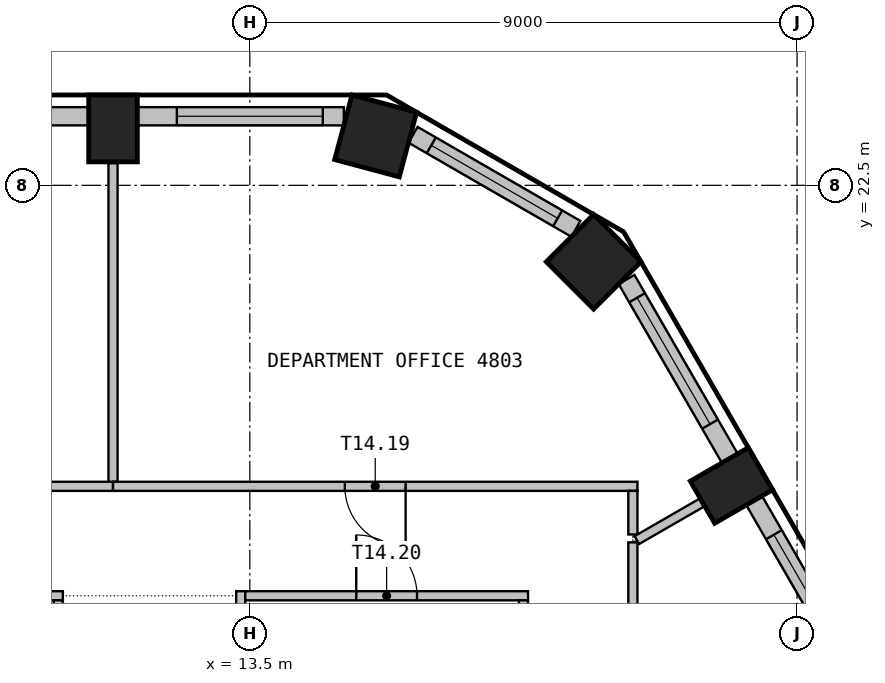
"""IFC4 building model, lengths in metres.
Left out: names, types, materials, properties, quantities, classifications, styles, units other than length and angle.
Written with IfcOpenShell. Run it as: python <this file> out.ifc"""

import sys

from ifc_helpers import new_model, si_unit, direction, frame, frame_2d, origin, origin_2d, place, context, subcontext, project, spatial, rectangle, extrude, element, fill, save


model = new_model("IFC4")
c1 = context("Model", 3, precision=1e-05, world=origin(), true_north=direction((0.0, 1.0)))
c2 = subcontext(c1, "Body", "Model", "MODEL_VIEW")
j1 = project(units=[si_unit("LENGTHUNIT", "METRE"), si_unit("PLANEANGLEUNIT", "RADIAN")], contexts=[c1])
p1 = place(None, origin())
s1 = spatial("IfcSite", under=j1, at=p1, CompositionType="ELEMENT")
p2 = place(p1, origin())
s2 = spatial("IfcBuilding", under=s1, at=p2, CompositionType="ELEMENT")
p3 = place(p2, frame((0.0, 0.0, 195.6)))
s3 = spatial("IfcBuildingStorey", under=s2, at=p3, CompositionType="ELEMENT", Elevation=195.6)
p4 = place(p3, frame((21.421, 17.563, 0.0), z_axis=(0.0, 0.0, 1.0), x_axis=(-0.5, 0.866025403784, 0.0)))
e1 = element("IfcColumn", 1, at=p4, inside=s3, PredefinedType="COLUMN", context=c2, shape_type="SweptSolid", body=[
    extrude(rectangle(XDim=0.8, YDim=1.1, at=origin_2d()), origin(), (0.0, 0.0, 1.0), 3.55),
])
for number, where, z_axis, x_axis in (
    (2, (19.154, 21.242, 0.0), (0.0, 0.0, 1.0), (-0.707, 0.707, 0.0)),
    (3, (15.57, 23.312, 0.0), (0.0, 0.0, 1.0), (-0.966, 0.259, 0.0)),
):
    element("IfcColumn", number, at=place(p3, frame(where, z_axis=z_axis, x_axis=x_axis)), inside=s3, PredefinedType="COLUMN", context=c2, shape_type="SweptSolid", body=[
        extrude(rectangle(XDim=1.1, YDim=1.1, at=origin_2d()), origin(), (0.0, 0.0, 1.0), 3.55),
    ])
p5 = place(p3, frame((11.25, 23.436, 0.0), z_axis=(0.0, 0.0, 1.0), x_axis=(-1.0, 0.0, 0.0)))
e4 = element("IfcColumn", 4, at=p5, inside=s3, PredefinedType="COLUMN", context=c2, shape_type="SweptSolid", body=[
    extrude(rectangle(XDim=0.8, YDim=1.1, at=origin_2d()), origin(), (0.0, 0.0, 1.0), 3.55),
])
p6 = place(p3, frame((23.644, 14.113, 0.0), z_axis=(0.0, 0.0, 1.0), x_axis=(-0.500029062817, 0.866008623709, 0.0)))
e5 = element("IfcWall", 5, at=p6, inside=s3, PredefinedType="SOLIDWALL", context=c2, shape_type="SweptSolid", body=[
    extrude(rectangle(XDim=3.699, YDim=0.3, at=frame_2d((1.85, 0.0))), origin(), (0.0, 0.0, 1.0), 3.55),
])
p7 = place(p6, frame((0.649, 0.0, 0.9)))
e6 = element("IfcOpeningElement", 6, at=p7, cuts=e5, PredefinedType="OPENING", context=c2, shape_type="SweptSolid", body=[
    extrude(rectangle(XDim=2.4, YDim=2.1, at=frame_2d((1.2, 1.05))), frame((0.0, 0.16, 0.0), z_axis=(0.0, -1.0, 0.0), x_axis=(1.0, 0.0, 0.0)), (0.0, 0.0, 1.0), 0.32),
])
p8 = place(p3, frame((21.394, 18.01, 0.0), z_axis=(0.0, 0.0, 1.0), x_axis=(-0.500012868213, 0.866017974191, 0.0)))
e7 = element("IfcWall", 7, at=p8, inside=s3, PredefinedType="SOLIDWALL", context=c2, shape_type="SweptSolid", body=[
    extrude(rectangle(XDim=3.396, YDim=0.3, at=frame_2d((1.698, 0.0))), origin(), (0.0, 0.0, 1.0), 3.55),
])
p9 = place(p8, frame((0.649, 0.0, 0.9)))
e8 = element("IfcOpeningElement", 8, at=p9, cuts=e7, PredefinedType="OPENING", context=c2, shape_type="SweptSolid", body=[
    extrude(rectangle(XDim=2.4, YDim=2.1, at=frame_2d((1.2, 1.05))), frame((0.0, 0.16, 0.0), z_axis=(0.0, -1.0, 0.0), x_axis=(1.0, 0.0, 0.0)), (0.0, 0.0, 1.0), 0.32),
])
p10 = place(p3, frame((18.863, 21.784, 0.0), z_axis=(0.0, 0.0, 1.0), x_axis=(-0.865994975416, 0.500052699777, 0.0)))
e9 = element("IfcWall", 9, at=p10, inside=s3, PredefinedType="SOLIDWALL", context=c2, shape_type="SweptSolid", body=[
    extrude(rectangle(XDim=3.093, YDim=0.3, at=frame_2d((1.546, 0.0))), origin(), (0.0, 0.0, 1.0), 3.55),
])
p11 = place(p10, frame((0.346, 0.0, 0.9)))
e10 = element("IfcOpeningElement", 10, at=p11, cuts=e9, PredefinedType="OPENING", context=c2, shape_type="SweptSolid", body=[
    extrude(rectangle(XDim=2.4, YDim=2.1, at=frame_2d((1.2, 1.05))), frame((0.0, 0.16, 0.0), z_axis=(0.0, -1.0, 0.0), x_axis=(1.0, 0.0, 0.0)), (0.0, 0.0, 1.0), 0.32),
])
p12 = place(p3, frame((15.046, 23.635, 0.0), z_axis=(0.0, 0.0, 1.0), x_axis=(-1.0, 0.0, 0.0)))
e11 = element("IfcWall", 11, at=p12, inside=s3, PredefinedType="SOLIDWALL", context=c2, shape_type="SweptSolid", body=[
    extrude(rectangle(XDim=3.396, YDim=0.3, at=frame_2d((1.698, 0.0))), origin(), (0.0, 0.0, 1.0), 3.55),
])
p13 = place(p12, frame((0.346, 0.0, 0.9)))
e12 = element("IfcOpeningElement", 12, at=p13, cuts=e11, PredefinedType="OPENING", context=c2, shape_type="SweptSolid", body=[
    extrude(rectangle(XDim=2.4, YDim=2.1, at=frame_2d((1.2, 1.05))), frame((0.0, 0.16, 0.0), z_axis=(0.0, -1.0, 0.0), x_axis=(1.0, 0.0, 0.0)), (0.0, 0.0, 1.0), 0.32),
])
p14 = place(p3, frame((10.85, 23.635, 0.0), z_axis=(0.0, 0.0, 1.0), x_axis=(-1.0, 0.0, 0.0)))
e13 = element("IfcWall", 13, at=p14, inside=s3, PredefinedType="SOLIDWALL", context=c2, shape_type="SweptSolid", body=[
    extrude(rectangle(XDim=3.699, YDim=0.3, at=frame_2d((1.85, 0.0))), origin(), (0.0, 0.0, 1.0), 3.55),
])
p15 = place(p14, frame((0.649, 0.0, 0.9)))
e14 = element("IfcOpeningElement", 14, at=p15, cuts=e13, PredefinedType="OPENING", context=c2, shape_type="SweptSolid", body=[
    extrude(rectangle(XDim=2.4, YDim=2.1, at=frame_2d((1.2, 1.05))), frame((0.0, 0.16, 0.0), z_axis=(0.0, -1.0, 0.0), x_axis=(1.0, 0.0, 0.0)), (0.0, 0.0, 1.0), 0.32),
])
p16 = place(p3, frame((11.25, 17.55, 0.0), z_axis=(0.0, 0.0, 1.0), x_axis=(-1.0, 0.0, 0.0)))
e15 = element("IfcWall", 15, at=p16, inside=s3, PredefinedType="PARTITIONING", context=c2, shape_type="SweptSolid", body=[
    extrude(rectangle(XDim=18.0, YDim=0.15, at=frame_2d((9.0, 0.0))), origin(), (0.0, 0.0, 1.0), 3.55),
])
p17 = place(p16, frame((8.5, 0.0, 0.0)))
e16 = element("IfcOpeningElement", 16, at=p17, cuts=e15, PredefinedType="OPENING", context=c2, shape_type="SweptSolid", body=[
    extrude(rectangle(XDim=1.0, YDim=2.1, at=frame_2d((0.5, 1.05))), frame((0.0, 0.085, 0.0), z_axis=(0.0, -1.0, 0.0), x_axis=(1.0, 0.0, 0.0)), (0.0, 0.0, 1.0), 0.17),
])
p18 = place(p3, frame((6.0, 15.75, 0.0), z_axis=(0.0, 0.0, 1.0), x_axis=(1.0, 0.0, 0.0)))
e17 = element("IfcWall", 17, at=p18, inside=s3, PredefinedType="PARTITIONING", context=c2, shape_type="SweptSolid", body=[
    extrude(rectangle(XDim=4.425, YDim=0.15, at=frame_2d((2.212, 0.0))), origin(), (0.0, 0.0, 1.0), 3.55),
])
p19 = place(p18, frame((1.712, 0.0, 0.0)))
e18 = element("IfcOpeningElement", 18, at=p19, cuts=e17, PredefinedType="OPENING", context=c2, shape_type="SweptSolid", body=[
    extrude(rectangle(XDim=1.0, YDim=2.1, at=frame_2d((0.5, 1.05))), frame((0.0, 0.085, 0.0), z_axis=(0.0, -1.0, 0.0), x_axis=(1.0, 0.0, 0.0)), (0.0, 0.0, 1.0), 0.17),
])
p20 = place(p3, frame((10.35, 15.675, 0.0), z_axis=(0.0, 0.0, 1.0), x_axis=(0.0, -1.0, 0.0)))
e19 = element("IfcWall", 19, at=p20, inside=s3, PredefinedType="PARTITIONING", context=c2, shape_type="SweptSolid", body=[
    extrude(rectangle(XDim=4.425, YDim=0.15, at=frame_2d((2.212, 0.0))), origin(), (0.0, 0.0, 1.0), 3.55),
])
p21 = place(p3, frame((11.25, 22.865, 0.0), z_axis=(0.0, 0.0, 1.0), x_axis=(0.0, -1.0, 0.0)))
e20 = element("IfcWall", 20, at=p21, inside=s3, PredefinedType="PARTITIONING", context=c2, shape_type="SweptSolid", body=[
    extrude(rectangle(XDim=5.24, YDim=0.15, at=frame_2d((2.62, 0.0))), origin(), (0.0, 0.0, 1.0), 3.55),
])
p22 = place(p3, frame((19.875, 17.55, 0.0), z_axis=(0.0, 0.0, 1.0), x_axis=(-1.0, 0.0, 0.0)))
e21 = element("IfcWall", 21, at=p22, inside=s3, PredefinedType="PARTITIONING", context=c2, shape_type="SweptSolid", body=[
    extrude(rectangle(XDim=8.625, YDim=0.15, at=frame_2d((4.312, 0.0))), origin(), (0.0, 0.0, 1.0), 3.55),
])
p23 = place(p22, frame((3.812, 0.0, 0.0)))
e22 = element("IfcOpeningElement", 22, at=p23, cuts=e21, PredefinedType="OPENING", context=c2, shape_type="SweptSolid", body=[
    extrude(rectangle(XDim=1.0, YDim=2.1, at=frame_2d((0.5, 1.05))), frame((0.0, 0.085, 0.0), z_axis=(0.0, -1.0, 0.0), x_axis=(1.0, 0.0, 0.0)), (0.0, 0.0, 1.0), 0.17),
])
p24 = place(p3, frame((13.35, 11.25, 0.0), z_axis=(0.0, 0.0, 1.0), x_axis=(0.0, 1.0, 0.0)))
e23 = element("IfcWall", 23, at=p24, inside=s3, PredefinedType="PARTITIONING", context=c2, shape_type="SweptSolid", body=[
    extrude(rectangle(XDim=4.575, YDim=0.15, at=frame_2d((2.288, 0.0))), origin(), (0.0, 0.0, 1.0), 3.55),
])
p25 = place(p3, frame((13.425, 15.75, 0.0), z_axis=(0.0, 0.0, 1.0), x_axis=(1.0, 0.0, 0.0)))
e24 = element("IfcWall", 24, at=p25, inside=s3, PredefinedType="PARTITIONING", context=c2, shape_type="SweptSolid", body=[
    extrude(rectangle(XDim=4.65, YDim=0.15, at=frame_2d((2.325, 0.0))), origin(), (0.0, 0.0, 1.0), 3.55),
])
p26 = place(p25, frame((1.825, 0.0, 0.0)))
e25 = element("IfcOpeningElement", 25, at=p26, cuts=e24, PredefinedType="OPENING", context=c2, shape_type="SweptSolid", body=[
    extrude(rectangle(XDim=1.0, YDim=2.1, at=frame_2d((0.5, 1.05))), frame((0.0, 0.085, 0.0), z_axis=(0.0, -1.0, 0.0), x_axis=(1.0, 0.0, 0.0)), (0.0, 0.0, 1.0), 0.17),
])
p27 = place(p3, frame((18.0, 15.675, 0.0), z_axis=(0.0, 0.0, 1.0), x_axis=(0.0, -1.0, 0.0)))
e26 = element("IfcWall", 26, at=p27, inside=s3, PredefinedType="PARTITIONING", context=c2, shape_type="SweptSolid", body=[
    extrude(rectangle(XDim=4.425, YDim=0.15, at=frame_2d((2.212, 0.0))), origin(), (0.0, 0.0, 1.0), 3.55),
])
p28 = place(p3, frame((19.8, 6.235, 0.0), z_axis=(0.0, 0.0, 1.0), x_axis=(0.0, 1.0, 0.0)))
e27 = element("IfcWall", 27, at=p28, inside=s3, PredefinedType="PARTITIONING", context=c2, shape_type="SweptSolid", body=[
    extrude(rectangle(XDim=10.393, YDim=0.15, at=frame_2d((5.196, 0.0))), origin(), (0.0, 0.0, 1.0), 3.55),
])
p29 = place(p28, frame((4.697, 0.0, 0.0)))
e28 = element("IfcOpeningElement", 28, at=p29, cuts=e27, PredefinedType="OPENING", context=c2, shape_type="SweptSolid", body=[
    extrude(rectangle(XDim=1.0, YDim=2.1, at=frame_2d((0.5, 1.05))), frame((0.0, 0.085, 0.0), z_axis=(0.0, -1.0, 0.0), x_axis=(1.0, 0.0, 0.0)), (0.0, 0.0, 1.0), 0.17),
])
p30 = place(p3, frame((19.8, 16.758, 0.0), z_axis=(0.0, 0.0, 1.0), x_axis=(0.0, 1.0, 0.0)))
e29 = element("IfcWall", 29, at=p30, inside=s3, PredefinedType="PARTITIONING", context=c2, shape_type="SweptSolid", body=[
    extrude(rectangle(XDim=0.717, YDim=0.15, at=frame_2d((0.358, 0.0))), origin(), (0.0, 0.0, 1.0), 3.55),
])
p31 = place(p3, frame((20.927, 17.278, 0.0), z_axis=(0.0, 0.0, 1.0), x_axis=(-0.866202157257, -0.499693728962, 0.0)))
e30 = element("IfcWall", 30, at=p31, inside=s3, PredefinedType="PARTITIONING", context=c2, shape_type="SweptSolid", body=[
    extrude(rectangle(XDim=1.226, YDim=0.15, at=frame_2d((0.613, 0.0))), origin(), (0.0, 0.0, 1.0), 3.55),
])
p32 = place(p7, origin())
e31 = element("IfcWindow", 31, at=p32, inside=s3, PartitioningType="SINGLE_PANEL", PredefinedType="WINDOW", context=c2, shape_type="SweptSolid", body=[
    extrude(rectangle(XDim=2.4, YDim=2.1, at=frame_2d((1.2, 1.05))), frame((0.0, 0.03, 0.0), z_axis=(0.0, -1.0, 0.0), x_axis=(1.0, 0.0, 0.0)), (0.0, 0.0, 1.0), 0.06),
])
fill(e6, e31)
p33 = place(p9, origin())
e32 = element("IfcWindow", 32, at=p33, inside=s3, PartitioningType="SINGLE_PANEL", PredefinedType="WINDOW", context=c2, shape_type="SweptSolid", body=[
    extrude(rectangle(XDim=2.4, YDim=2.1, at=frame_2d((1.2, 1.05))), frame((0.0, 0.03, 0.0), z_axis=(0.0, -1.0, 0.0), x_axis=(1.0, 0.0, 0.0)), (0.0, 0.0, 1.0), 0.06),
])
fill(e8, e32)
p34 = place(p11, origin())
e33 = element("IfcWindow", 33, at=p34, inside=s3, PartitioningType="SINGLE_PANEL", PredefinedType="WINDOW", context=c2, shape_type="SweptSolid", body=[
    extrude(rectangle(XDim=2.4, YDim=2.1, at=frame_2d((1.2, 1.05))), frame((0.0, 0.03, 0.0), z_axis=(0.0, -1.0, 0.0), x_axis=(1.0, 0.0, 0.0)), (0.0, 0.0, 1.0), 0.06),
])
fill(e10, e33)
p35 = place(p13, origin())
e34 = element("IfcWindow", 34, at=p35, inside=s3, PartitioningType="SINGLE_PANEL", PredefinedType="WINDOW", context=c2, shape_type="SweptSolid", body=[
    extrude(rectangle(XDim=2.4, YDim=2.1, at=frame_2d((1.2, 1.05))), frame((0.0, 0.03, 0.0), z_axis=(0.0, -1.0, 0.0), x_axis=(1.0, 0.0, 0.0)), (0.0, 0.0, 1.0), 0.06),
])
fill(e12, e34)
p36 = place(p23, origin())
e35 = element("IfcDoor", 35, at=p36, inside=s3, OperationType="SINGLE_SWING_RIGHT", PredefinedType="DOOR", context=c2, shape_type="SweptSolid", body=[
    extrude(rectangle(XDim=1.0, YDim=2.1, at=frame_2d((0.5, 1.05))), frame((0.0, 0.025, 0.0), z_axis=(0.0, -1.0, 0.0), x_axis=(1.0, 0.0, 0.0)), (0.0, 0.0, 1.0), 0.05),
])
fill(e22, e35)
p37 = place(p26, origin())
e36 = element("IfcDoor", 36, at=p37, inside=s3, OperationType="SINGLE_SWING_LEFT", PredefinedType="DOOR", context=c2, shape_type="SweptSolid", body=[
    extrude(rectangle(XDim=1.0, YDim=2.1, at=frame_2d((0.5, 1.05))), frame((0.0, 0.025, 0.0), z_axis=(0.0, -1.0, 0.0), x_axis=(1.0, 0.0, 0.0)), (0.0, 0.0, 1.0), 0.05),
])
fill(e25, e36)
save(model, sys.argv[1])
